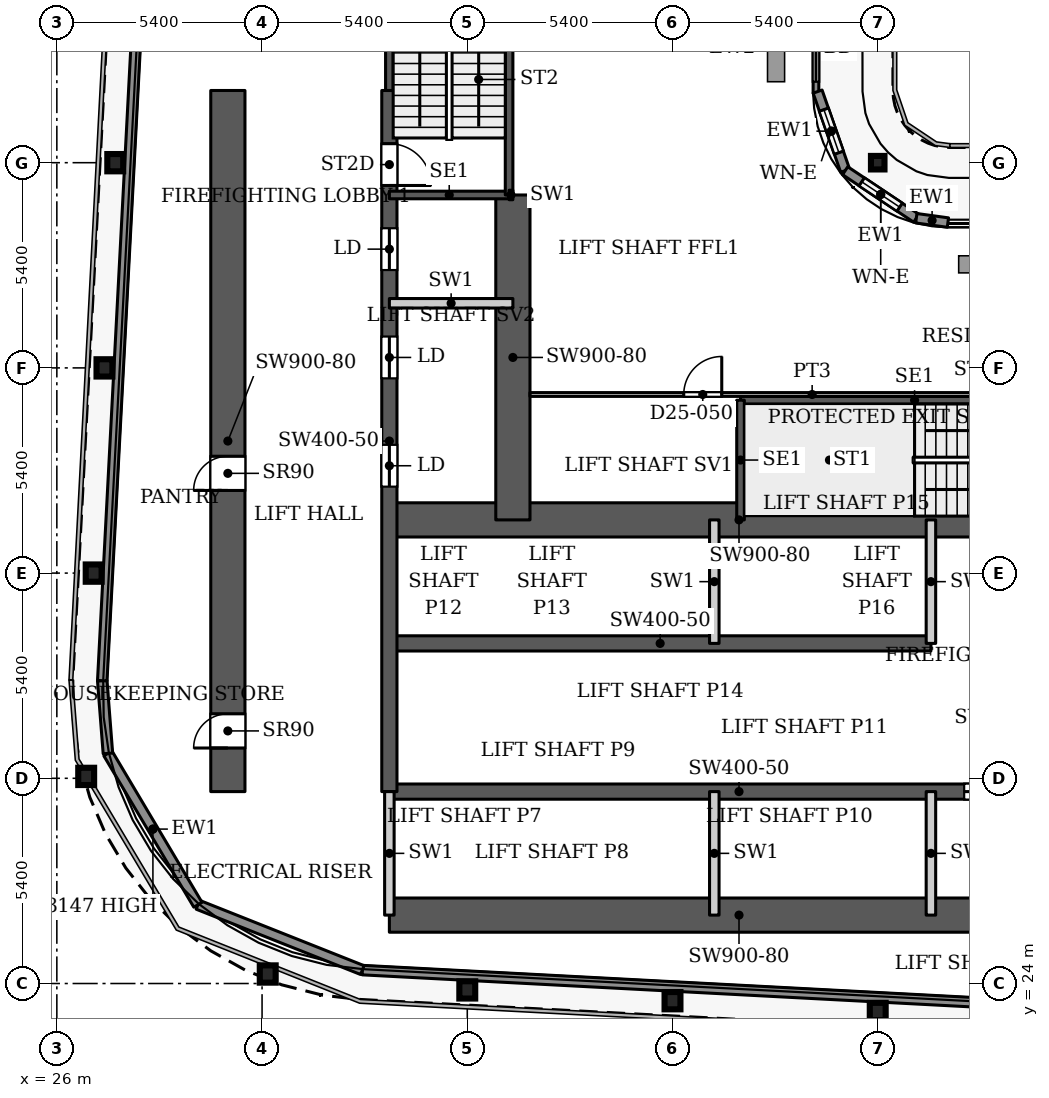
"""IFC4 building model, lengths in metres.
Left out: names, types, materials, properties, quantities, classifications, styles, units other than length and angle.
Written with IfcOpenShell. Run it as: python <this file> out.ifc"""

import sys

from ifc_helpers import new_model, si_unit, direction, frame, frame_2d, origin, origin_2d, place, context, subcontext, project, spatial, rectangle, hollow_rectangle, i_section, extrude, source, transform, mapped, element, fill, save


model = new_model("IFC4")
c1 = context("Model", 3, precision=1e-05, world=origin(), true_north=direction((0.0, 1.0)))
c2 = subcontext(c1, "Body", "Model", "MODEL_VIEW")
j1 = project(units=[si_unit("LENGTHUNIT", "METRE"), si_unit("PLANEANGLEUNIT", "RADIAN")], contexts=[c1])
p1 = place(None, origin())
s1 = spatial("IfcSite", under=j1, at=p1, CompositionType="ELEMENT")
p2 = place(p1, origin())
s2 = spatial("IfcBuilding", under=s1, at=p2, CompositionType="ELEMENT")
p3 = place(p2, frame((0.0, 0.0, 113.6)))
s3 = spatial("IfcBuildingStorey", under=s2, at=p3, CompositionType="ELEMENT", Elevation=113.6)
for number, where, z_axis, x_axis in (
    (1, (47.6, 23.264, 0.0), (0.0, 0.0, 1.0), (1.0, 0.0, 0.0)),
    (2, (42.2, 23.548, 0.0), (0.0, 0.0, 1.0), (1.0, 0.0, 0.0)),
    (3, (36.8, 23.832, 0.0), (0.0, 0.0, 1.0), (1.0, 0.0, 0.0)),
    (4, (31.549, 24.25, 0.0), (0.0, 0.0, 1.0), (1.0, 0.0, 0.0)),
    (5, (26.772, 29.45, 0.0), (0.0, 0.0, 1.0), (1.0, 0.0, 0.0)),
    (6, (26.969, 34.8, 0.0), (0.0, 0.0, 1.0), (1.0, 0.0, 0.0)),
    (7, (27.253, 40.2, 0.0), (0.0, 0.0, 1.0), (1.0, 0.0, 0.0)),
    (8, (27.537, 45.6, 0.0), (0.0, 0.0, 1.0), (1.0, 0.0, 0.0)),
):
    element("IfcColumn", number, at=place(p3, frame(where, z_axis=z_axis, x_axis=x_axis)), inside=s3, PredefinedType="COLUMN", context=c2, shape_type="SweptSolid", body=[
        extrude(i_section(OverallWidth=0.418, OverallDepth=0.455, WebThickness=0.042, FlangeThickness=0.068, FilletRadius=0.014, at=origin_2d()), origin(), (0.0, 0.0, 1.0), 3.9),
    ])
p4 = place(p3, frame((47.6, 45.6, 0.0), z_axis=(0.0, 0.0, 1.0), x_axis=(1.0, 0.0, 0.0)))
e9 = element("IfcColumn", 9, at=p4, inside=s3, PredefinedType="COLUMN", context=c2, shape_type="SweptSolid", body=[
    extrude(hollow_rectangle(XDim=0.356, YDim=0.356, WallThickness=0.016, InnerFilletRadius=0.016, OuterFilletRadius=0.032, at=origin_2d()), origin(), (0.0, 0.0, 1.0), 3.9),
])
p5 = place(p3, frame((34.75, 25.8, 0.0), z_axis=(0.0, 0.0, 1.0), x_axis=(1.0, 0.0, 0.0)))
e10 = element("IfcWall", 10, at=p5, inside=s3, PredefinedType="SHEAR", context=c2, shape_type="SweptSolid", body=[
    extrude(rectangle(XDim=18.4, YDim=0.9, at=frame_2d((9.2, 0.0))), origin(), (0.0, 0.0, 1.0), 3.9),
])
p6 = place(p3, frame((34.75, 29.05, 0.0), z_axis=(0.0, 0.0, 1.0), x_axis=(1.0, 0.0, 0.0)))
e11 = element("IfcWall", 11, at=p6, inside=s3, PredefinedType="SHEAR", context=c2, shape_type="SweptSolid", body=[
    extrude(rectangle(XDim=18.4, YDim=0.4, at=frame_2d((9.2, 0.0))), origin(), (0.0, 0.0, 1.0), 3.9),
])
p7 = place(p6, frame((15.125, 0.0, 0.0)))
e12 = element("IfcOpeningElement", 12, at=p7, cuts=e11, PredefinedType="OPENING", context=c2, shape_type="SweptSolid", body=[
    extrude(rectangle(XDim=1.1, YDim=2.2, at=frame_2d((0.55, 1.1))), frame((0.0, 0.21, 0.0), z_axis=(0.0, -1.0, 0.0), x_axis=(1.0, 0.0, 0.0)), (0.0, 0.0, 1.0), 0.42),
])
p8 = place(p3, frame((34.75, 32.95, 0.0), z_axis=(0.0, 0.0, 1.0), x_axis=(1.0, 0.0, 0.0)))
e13 = element("IfcWall", 13, at=p8, inside=s3, PredefinedType="SHEAR", context=c2, shape_type="SweptSolid", body=[
    extrude(rectangle(XDim=14.25, YDim=0.4, at=frame_2d((7.125, 0.0))), origin(), (0.0, 0.0, 1.0), 3.9),
])
p9 = place(p3, frame((34.75, 36.2, 0.0), z_axis=(0.0, 0.0, 1.0), x_axis=(1.0, 0.0, 0.0)))
e14 = element("IfcWall", 14, at=p9, inside=s3, PredefinedType="SHEAR", context=c2, shape_type="SweptSolid", body=[
    extrude(rectangle(XDim=18.4, YDim=0.9, at=frame_2d((9.2, 0.0))), origin(), (0.0, 0.0, 1.0), 3.9),
])
p10 = place(p9, frame((16.9, 0.0, 0.0)))
e15 = element("IfcOpeningElement", 15, at=p10, cuts=e14, PredefinedType="OPENING", context=c2, shape_type="SweptSolid", body=[
    extrude(rectangle(XDim=1.0, YDim=2.2, at=frame_2d((0.5, 1.1))), frame((0.0, 0.46, 0.0), z_axis=(0.0, -1.0, 0.0), x_axis=(1.0, 0.0, 0.0)), (0.0, 0.0, 1.0), 0.92),
])
p11 = place(p3, frame((34.75, 29.05, 0.0), z_axis=(0.0, 0.0, 1.0), x_axis=(0.0, 1.0, 0.0)))
e16 = element("IfcWall", 16, at=p11, inside=s3, PredefinedType="SHEAR", context=c2, shape_type="SweptSolid", body=[
    extrude(rectangle(XDim=18.45, YDim=0.4, at=frame_2d((9.225, 0.0))), origin(), (0.0, 0.0, 1.0), 3.9),
])
p12 = place(p11, frame((8.025, 0.0, 0.0)))
e17 = element("IfcOpeningElement", 17, at=p12, cuts=e16, PredefinedType="OPENING", context=c2, shape_type="SweptSolid", body=[
    extrude(rectangle(XDim=1.1, YDim=2.2, at=frame_2d((0.55, 1.1))), frame((0.0, 0.21, 0.0), z_axis=(0.0, -1.0, 0.0), x_axis=(1.0, 0.0, 0.0)), (0.0, 0.0, 1.0), 0.42),
])
p13 = place(p11, frame((10.875, 0.0, 0.0)))
e18 = element("IfcOpeningElement", 18, at=p13, cuts=e16, PredefinedType="OPENING", context=c2, shape_type="SweptSolid", body=[
    extrude(rectangle(XDim=1.1, YDim=2.2, at=frame_2d((0.55, 1.1))), frame((0.0, 0.21, 0.0), z_axis=(0.0, -1.0, 0.0), x_axis=(1.0, 0.0, 0.0)), (0.0, 0.0, 1.0), 0.42),
])
p14 = place(p11, frame((13.725, 0.0, 0.0)))
e19 = element("IfcOpeningElement", 19, at=p14, cuts=e16, PredefinedType="OPENING", context=c2, shape_type="SweptSolid", body=[
    extrude(rectangle(XDim=1.1, YDim=2.2, at=frame_2d((0.55, 1.1))), frame((0.0, 0.21, 0.0), z_axis=(0.0, -1.0, 0.0), x_axis=(1.0, 0.0, 0.0)), (0.0, 0.0, 1.0), 0.42),
])
p15 = place(p11, frame((15.95, 0.0, 0.0)))
e20 = element("IfcOpeningElement", 20, at=p15, cuts=e16, PredefinedType="OPENING", context=c2, shape_type="SweptSolid", body=[
    extrude(rectangle(XDim=1.1, YDim=2.2, at=frame_2d((0.55, 1.1))), frame((0.0, 0.21, 0.0), z_axis=(0.0, -1.0, 0.0), x_axis=(1.0, 0.0, 0.0)), (0.0, 0.0, 1.0), 0.42),
])
p16 = place(p3, frame((38.0, 36.2, 0.0), z_axis=(0.0, 0.0, 1.0), x_axis=(0.0, 1.0, 0.0)))
e21 = element("IfcWall", 21, at=p16, inside=s3, PredefinedType="SHEAR", context=c2, shape_type="SweptSolid", body=[
    extrude(rectangle(XDim=8.55, YDim=0.9, at=frame_2d((4.275, 0.0))), origin(), (0.0, 0.0, 1.0), 3.9),
])
p17 = place(p3, frame((30.5, 29.05, 0.0), z_axis=(0.0, 0.0, 1.0), x_axis=(0.0, 1.0, 0.0)))
e22 = element("IfcWall", 22, at=p17, inside=s3, PredefinedType="SHEAR", context=c2, shape_type="SweptSolid", body=[
    extrude(rectangle(XDim=18.45, YDim=0.9, at=frame_2d((9.225, 0.0))), origin(), (0.0, 0.0, 1.0), 3.9),
])
p18 = place(p17, frame((1.147, 0.0, 0.0)))
e23 = element("IfcOpeningElement", 23, at=p18, cuts=e22, PredefinedType="OPENING", context=c2, shape_type="SweptSolid", body=[
    extrude(rectangle(XDim=0.9, YDim=2.2, at=frame_2d((0.45, 1.1))), frame((0.0, 0.46, 0.0), z_axis=(0.0, -1.0, 0.0), x_axis=(1.0, 0.0, 0.0)), (0.0, 0.0, 1.0), 0.92),
])
p19 = place(p17, frame((7.925, 0.0, 0.0)))
e24 = element("IfcOpeningElement", 24, at=p19, cuts=e22, PredefinedType="OPENING", context=c2, shape_type="SweptSolid", body=[
    extrude(rectangle(XDim=0.9, YDim=2.2, at=frame_2d((0.45, 1.1))), frame((0.0, 0.46, 0.0), z_axis=(0.0, -1.0, 0.0), x_axis=(1.0, 0.0, 0.0)), (0.0, 0.0, 1.0), 0.92),
])
p20 = place(p3, frame((45.975, 49.83, 0.0), z_axis=(0.0, 0.0, 1.0), x_axis=(0.0, -1.0, 0.0)))
e25 = element("IfcWall", 25, at=p20, inside=s3, PredefinedType="SOLIDWALL", context=c2, shape_type="SweptSolid", body=[
    extrude(rectangle(XDim=2.4, YDim=0.15, at=frame_2d((1.2, 0.0))), origin(), (0.0, 0.0, 1.0), 3.75),
])
p21 = place(p20, frame((0.3, 0.0, 0.0)))
e26 = element("IfcOpeningElement", 26, at=p21, cuts=e25, PredefinedType="OPENING", context=c2, shape_type="SweptSolid", body=[
    extrude(rectangle(XDim=1.8, YDim=2.4, at=frame_2d((0.9, 1.2))), frame((0.0, 0.085, 0.0), z_axis=(0.0, -1.0, 0.0), x_axis=(1.0, 0.0, 0.0)), (0.0, 0.0, 1.0), 0.17),
])
p22 = place(p3, frame((46.018, 47.471, 0.0), z_axis=(0.0, 0.0, 1.0), x_axis=(0.328791208903, -0.944402637093, 0.0)))
e27 = element("IfcWall", 27, at=p22, inside=s3, PredefinedType="SOLIDWALL", context=c2, shape_type="SweptSolid", body=[
    extrude(rectangle(XDim=2.205, YDim=0.25, at=frame_2d((1.102, 0.0))), origin(), (0.0, 0.0, 1.0), 3.75),
])
p23 = place(p22, frame((0.503, 0.0, 0.6)))
e28 = element("IfcOpeningElement", 28, at=p23, cuts=e27, PredefinedType="OPENING", context=c2, shape_type="SweptSolid", body=[
    extrude(rectangle(XDim=1.2, YDim=2.1, at=frame_2d((0.6, 1.05))), frame((0.0, 0.135, 0.0), z_axis=(0.0, -1.0, 0.0), x_axis=(1.0, 0.0, 0.0)), (0.0, 0.0, 1.0), 0.27),
])
p24 = place(p3, frame((46.743, 45.389, 0.0), z_axis=(0.0, 0.0, 1.0), x_axis=(0.831449265529, -0.555600682912, 0.0)))
e29 = element("IfcWall", 29, at=p24, inside=s3, PredefinedType="SOLIDWALL", context=c2, shape_type="SweptSolid", body=[
    extrude(rectangle(XDim=2.251, YDim=0.25, at=frame_2d((1.126, 0.0))), origin(), (0.0, 0.0, 1.0), 3.75),
])
p25 = place(p24, frame((0.525, 0.0, 0.6)))
e30 = element("IfcOpeningElement", 30, at=p25, cuts=e29, PredefinedType="OPENING", context=c2, shape_type="SweptSolid", body=[
    extrude(rectangle(XDim=1.2, YDim=2.1, at=frame_2d((0.6, 1.05))), frame((0.0, 0.135, 0.0), z_axis=(0.0, -1.0, 0.0), x_axis=(1.0, 0.0, 0.0)), (0.0, 0.0, 1.0), 0.27),
])
p26 = place(p3, frame((48.615, 44.138, 0.0), z_axis=(0.0, 0.0, 1.0), x_axis=(0.990741504246, -0.135761819977, 0.0)))
e31 = element("IfcWall", 31, at=p26, inside=s3, PredefinedType="SOLIDWALL", context=c2, shape_type="SweptSolid", body=[
    extrude(rectangle(XDim=0.84, YDim=0.25, at=frame_2d((0.42, 0.0))), origin(), (0.0, 0.0, 1.0), 3.75),
])
p27 = place(p3, frame((100.586, 20.85, 0.0), z_axis=(0.0, 0.0, 1.0), x_axis=(-0.99861746497, 0.052565755559, 0.0)))
e32 = element("IfcWall", 32, at=p27, inside=s3, PredefinedType="SOLIDWALL", context=c2, shape_type="SweptSolid", body=[
    extrude(rectangle(XDim=66.639, YDim=0.25, at=frame_2d((33.319, 0.0))), origin(), (0.0, 0.0, 1.0), 3.75),
])
p28 = place(p3, frame((34.039, 24.353, 0.0), z_axis=(0.0, 0.0, 1.0), x_axis=(-0.929352825399, 0.369192803184, 0.0)))
e33 = element("IfcWall", 33, at=p28, inside=s3, PredefinedType="SOLIDWALL", context=c2, shape_type="SweptSolid", body=[
    extrude(rectangle(XDim=4.656, YDim=0.25, at=frame_2d((2.328, 0.0))), origin(), (0.0, 0.0, 1.0), 3.75),
])
p29 = place(p3, frame((29.712, 26.072, 0.0), z_axis=(0.0, 0.0, 1.0), x_axis=(-0.511028049012, 0.859564036662, 0.0)))
e34 = element("IfcWall", 34, at=p29, inside=s3, PredefinedType="SOLIDWALL", context=c2, shape_type="SweptSolid", body=[
    extrude(rectangle(XDim=4.634, YDim=0.25, at=frame_2d((2.317, 0.0))), origin(), (0.0, 0.0, 1.0), 3.147),
])
p30 = place(p3, frame((27.344, 30.055, 0.0), z_axis=(0.0, 0.0, 1.0), x_axis=(-0.077571675317, 0.99698677784, 0.0)))
e35 = element("IfcWall", 35, at=p30, inside=s3, PredefinedType="SOLIDWALL", context=c2, shape_type="SweptSolid", body=[
    extrude(rectangle(XDim=1.92, YDim=0.25, at=frame_2d((0.96, 0.0))), origin(), (0.0, 0.0, 1.0), 3.75),
])
p31 = place(p3, frame((27.195, 31.969, 0.0), z_axis=(0.0, 0.0, 1.0), x_axis=(0.052555284099, 0.998618016117, 0.0)))
e36 = element("IfcWall", 36, at=p31, inside=s3, PredefinedType="SOLIDWALL", context=c2, shape_type="SweptSolid", body=[
    extrude(rectangle(XDim=61.38, YDim=0.25, at=frame_2d((30.69, 0.0))), origin(), (0.0, 0.0, 1.0), 3.75),
])
p32 = place(p3, frame((43.99, 39.35, 0.0), z_axis=(0.0, 0.0, 1.0), x_axis=(1.0, 0.0, 0.0)))
e37 = element("IfcWall", 37, at=p32, inside=s3, PredefinedType="SHEAR", context=c2, shape_type="SweptSolid", body=[
    extrude(rectangle(XDim=9.16, YDim=0.2, at=frame_2d((4.58, 0.0))), origin(), (0.0, 0.0, 1.0), 3.9),
])
p33 = place(p3, frame((43.99, 36.2, 0.0), z_axis=(0.0, 0.0, 1.0), x_axis=(0.0, 1.0, 0.0)))
e38 = element("IfcWall", 38, at=p33, inside=s3, PredefinedType="SHEAR", context=c2, shape_type="SweptSolid", body=[
    extrude(rectangle(XDim=3.15, YDim=0.2, at=frame_2d((1.575, 0.0))), origin(), (0.0, 0.0, 1.0), 3.9),
])
p34 = place(p3, frame((34.75, 44.75, 0.0), z_axis=(0.0, 0.0, 1.0), x_axis=(1.0, 0.0, 0.0)))
e39 = element("IfcWall", 39, at=p34, inside=s3, PredefinedType="SHEAR", context=c2, shape_type="SweptSolid", body=[
    extrude(rectangle(XDim=3.15, YDim=0.2, at=frame_2d((1.575, 0.0))), origin(), (0.0, 0.0, 1.0), 3.9),
])
p35 = place(p3, frame((34.75, 47.5, 0.0), z_axis=(0.0, 0.0, 1.0), x_axis=(0.0, 1.0, 0.0)))
e40 = element("IfcWall", 40, at=p35, inside=s3, PredefinedType="SHEAR", context=c2, shape_type="SweptSolid", body=[
    extrude(rectangle(XDim=6.41, YDim=0.2, at=frame_2d((3.205, 0.0))), origin(), (0.0, 0.0, 1.0), 3.9),
])
p36 = place(p3, frame((37.9, 44.75, 0.0), z_axis=(0.0, 0.0, 1.0), x_axis=(0.0, 1.0, 0.0)))
e41 = element("IfcWall", 41, at=p36, inside=s3, PredefinedType="SHEAR", context=c2, shape_type="SweptSolid", body=[
    extrude(rectangle(XDim=9.16, YDim=0.2, at=frame_2d((4.58, 0.0))), origin(), (0.0, 0.0, 1.0), 3.9),
])
for number, where, z_axis, x_axis in (
    (42, (34.75, 25.8, 0.0), (0.0, 0.0, 1.0), (0.0, 1.0, 0.0)),
    (43, (43.3, 25.8, 0.0), (0.0, 0.0, 1.0), (0.0, 1.0, 0.0)),
    (44, (43.3, 32.95, 0.0), (0.0, 0.0, 1.0), (0.0, 1.0, 0.0)),
    (45, (49.0, 25.8, 0.0), (0.0, 0.0, 1.0), (0.0, 1.0, 0.0)),
    (46, (49.0, 32.95, 0.0), (0.0, 0.0, 1.0), (0.0, 1.0, 0.0)),
    (47, (34.75, 41.9, 0.0), (0.0, 0.0, 1.0), (1.0, 0.0, 0.0)),
):
    element("IfcWall", number, at=place(p3, frame(where, z_axis=z_axis, x_axis=x_axis)), inside=s3, PredefinedType="PARTITIONING", context=c2, shape_type="SweptSolid", body=[
        extrude(rectangle(XDim=3.25, YDim=0.25, at=frame_2d((1.625, 0.0))), origin(), (0.0, 0.0, 1.0), 3.9),
    ])
p37 = place(p3, frame((37.9, 44.75, 0.0), z_axis=(0.0, 0.0, 1.0), x_axis=(1.0, 0.0, 0.0)))
e48 = element("IfcWall", 48, at=p37, inside=s3, PredefinedType="PARTITIONING", context=c2, shape_type="SweptSolid", body=[
    extrude(rectangle(XDim=0.1, YDim=0.25, at=frame_2d((0.05, 0.0))), origin(), (0.0, 0.0, 1.0), 3.9),
])
p38 = place(p3, frame((38.449, 39.5, 0.0), z_axis=(0.0, 0.0, 1.0), x_axis=(1.0, 0.0, 0.0)))
e49 = element("IfcWall", 49, at=p38, inside=s3, PredefinedType="PARTITIONING", context=c2, shape_type="SweptSolid", body=[
    extrude(rectangle(XDim=14.851, YDim=0.1, at=frame_2d((7.426, 0.0))), origin(), (0.0, 0.0, 1.0), 3.6),
])
p39 = place(p38, frame((4.047, 0.0, 0.0)))
e50 = element("IfcOpeningElement", 50, at=p39, cuts=e49, PredefinedType="OPENING", context=c2, shape_type="SweptSolid", body=[
    extrude(rectangle(XDim=1.0, YDim=2.1, at=frame_2d((0.5, 1.05))), frame((0.0, 0.06, 0.0), z_axis=(0.0, -1.0, 0.0), x_axis=(1.0, 0.0, 0.0)), (0.0, 0.0, 1.0), 0.12),
])
m1 = source(origin(), c2, "Body", "SweptSolid", [
    extrude(rectangle(XDim=1.8, YDim=2.4, at=frame_2d((0.9, 1.2))), frame((0.0, 0.025, 0.0), z_axis=(0.0, -1.0, 0.0), x_axis=(1.0, 0.0, 0.0)), (0.0, 0.0, 1.0), 0.05),
])
p40 = place(p21, origin())
e51 = element("IfcDoor", 51, at=p40, inside=s3, OperationType="SLIDING_TO_LEFT", PredefinedType="DOOR", context=c2, shape_type="MappedRepresentation", body=[
    mapped(m1, transform((0.0, 0.0, 0.0), x_axis=(1.0, 0.0, 0.0), y_axis=(0.0, 1.0, 0.0), z_axis=(0.0, 0.0, 1.0), scale=1.0)),
])
fill(e26, e51)
m2 = source(origin(), c2, "Body", "SweptSolid", [
    extrude(rectangle(XDim=1.2, YDim=2.1, at=frame_2d((0.6, 1.05))), frame((0.0, 0.03, 0.0), z_axis=(0.0, -1.0, 0.0), x_axis=(1.0, 0.0, 0.0)), (0.0, 0.0, 1.0), 0.06),
])
p41 = place(p23, origin())
e52 = element("IfcWindow", 52, at=p41, inside=s3, PartitioningType="SINGLE_PANEL", PredefinedType="WINDOW", context=c2, shape_type="MappedRepresentation", body=[
    mapped(m2, transform((0.0, 0.0, 0.0), x_axis=(1.0, 0.0, 0.0), y_axis=(0.0, 1.0, 0.0), z_axis=(0.0, 0.0, 1.0), scale=1.0)),
])
fill(e28, e52)
p42 = place(p25, origin())
e53 = element("IfcWindow", 53, at=p42, inside=s3, PartitioningType="SINGLE_PANEL", PredefinedType="WINDOW", context=c2, shape_type="MappedRepresentation", body=[
    mapped(m2, transform((0.0, 0.0, 0.0), x_axis=(1.0, 0.0, 0.0), y_axis=(0.0, 1.0, 0.0), z_axis=(0.0, 0.0, 1.0), scale=1.0)),
])
fill(e30, e53)
m3 = source(origin(), c2, "Body", "SweptSolid", [
    extrude(rectangle(XDim=1.1, YDim=2.2, at=frame_2d((0.55, 1.1))), frame((0.0, 0.025, 0.0), z_axis=(0.0, -1.0, 0.0), x_axis=(1.0, 0.0, 0.0)), (0.0, 0.0, 1.0), 0.05),
])
p43 = place(p12, origin())
e54 = element("IfcDoor", 54, at=p43, inside=s3, OperationType="SLIDING_TO_LEFT", PredefinedType="DOOR", context=c2, shape_type="MappedRepresentation", body=[
    mapped(m3, transform((0.0, 0.0, 0.0), x_axis=(1.0, 0.0, 0.0), y_axis=(0.0, 1.0, 0.0), z_axis=(0.0, 0.0, 1.0), scale=1.0)),
])
fill(e17, e54)
p44 = place(p13, origin())
e55 = element("IfcDoor", 55, at=p44, inside=s3, OperationType="SLIDING_TO_LEFT", PredefinedType="DOOR", context=c2, shape_type="MappedRepresentation", body=[
    mapped(m3, transform((0.0, 0.0, 0.0), x_axis=(1.0, 0.0, 0.0), y_axis=(0.0, 1.0, 0.0), z_axis=(0.0, 0.0, 1.0), scale=1.0)),
])
fill(e18, e55)
p45 = place(p14, origin())
e56 = element("IfcDoor", 56, at=p45, inside=s3, OperationType="SLIDING_TO_LEFT", PredefinedType="DOOR", context=c2, shape_type="MappedRepresentation", body=[
    mapped(m3, transform((0.0, 0.0, 0.0), x_axis=(1.0, 0.0, 0.0), y_axis=(0.0, 1.0, 0.0), z_axis=(0.0, 0.0, 1.0), scale=1.0)),
])
fill(e19, e56)
p46 = place(p7, origin())
e57 = element("IfcDoor", 57, at=p46, inside=s3, OperationType="SLIDING_TO_LEFT", PredefinedType="DOOR", context=c2, shape_type="MappedRepresentation", body=[
    mapped(m3, transform((0.0, 0.0, 0.0), x_axis=(1.0, 0.0, 0.0), y_axis=(0.0, 1.0, 0.0), z_axis=(0.0, 0.0, 1.0), scale=1.0)),
])
fill(e12, e57)
m4 = source(origin(), c2, "Body", "SweptSolid", [
    extrude(rectangle(XDim=0.9, YDim=2.2, at=frame_2d((0.45, 1.1))), frame((0.0, 0.025, 0.0), z_axis=(0.0, -1.0, 0.0), x_axis=(1.0, 0.0, 0.0)), (0.0, 0.0, 1.0), 0.05),
])
p47 = place(p18, origin())
e58 = element("IfcDoor", 58, at=p47, inside=s3, OperationType="SINGLE_SWING_LEFT", PredefinedType="DOOR", context=c2, shape_type="MappedRepresentation", body=[
    mapped(m4, transform((0.0, 0.0, 0.0), x_axis=(1.0, 0.0, 0.0), y_axis=(0.0, 1.0, 0.0), z_axis=(0.0, 0.0, 1.0), scale=1.0)),
])
fill(e23, e58)
p48 = place(p19, origin())
e59 = element("IfcDoor", 59, at=p48, inside=s3, OperationType="SINGLE_SWING_LEFT", PredefinedType="DOOR", context=c2, shape_type="MappedRepresentation", body=[
    mapped(m4, transform((0.0, 0.0, 0.0), x_axis=(1.0, 0.0, 0.0), y_axis=(0.0, 1.0, 0.0), z_axis=(0.0, 0.0, 1.0), scale=1.0)),
])
fill(e24, e59)
m5 = source(origin(), c2, "Body", "SweptSolid", [
    extrude(rectangle(XDim=1.1, YDim=2.2, at=frame_2d((0.55, 1.1))), frame((0.0, 0.025, 0.0), z_axis=(0.0, -1.0, 0.0), x_axis=(1.0, 0.0, 0.0)), (0.0, 0.0, 1.0), 0.05),
])
p49 = place(p15, origin())
e60 = element("IfcDoor", 60, at=p49, inside=s3, OperationType="SINGLE_SWING_RIGHT", PredefinedType="DOOR", context=c2, shape_type="MappedRepresentation", body=[
    mapped(m5, transform((0.0, 0.0, 0.0), x_axis=(1.0, 0.0, 0.0), y_axis=(0.0, 1.0, 0.0), z_axis=(0.0, 0.0, 1.0), scale=1.0)),
])
fill(e20, e60)
m6 = source(origin(), c2, "Body", "SweptSolid", [
    extrude(rectangle(XDim=1.0, YDim=2.1, at=frame_2d((0.5, 1.05))), frame((0.0, 0.025, 0.0), z_axis=(0.0, -1.0, 0.0), x_axis=(1.0, 0.0, 0.0)), (0.0, 0.0, 1.0), 0.05),
])
p50 = place(p39, origin())
e61 = element("IfcDoor", 61, at=p50, inside=s3, OperationType="SINGLE_SWING_LEFT", PredefinedType="DOOR", context=c2, shape_type="MappedRepresentation", body=[
    mapped(m6, transform((0.0, 0.0, 0.0), x_axis=(1.0, 0.0, 0.0), y_axis=(0.0, 1.0, 0.0), z_axis=(0.0, 0.0, 1.0), scale=1.0)),
])
fill(e50, e61)
save(model, sys.argv[1])
